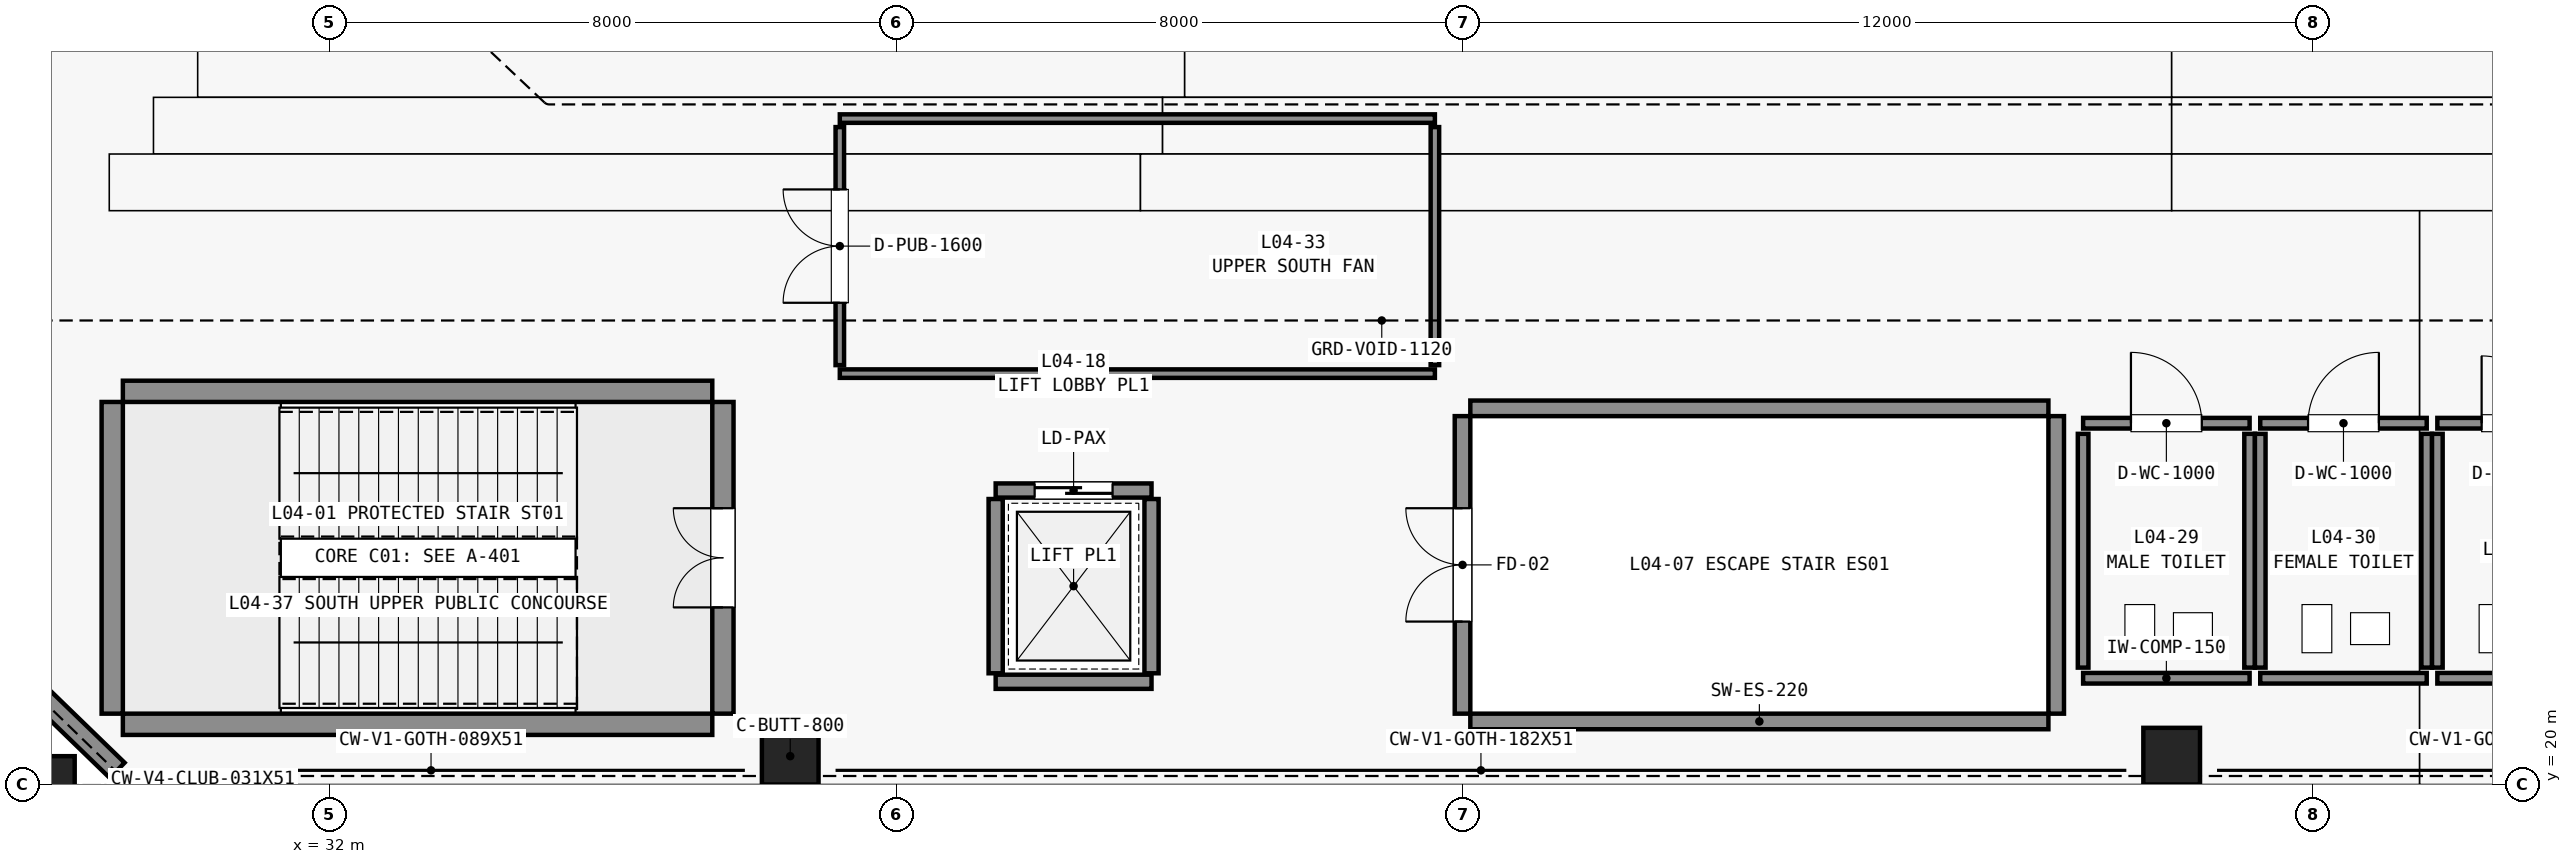
"""IFC4 building model, lengths in metres.
Left out: names, types, materials, properties, quantities, classifications, styles, units other than length and angle.
Written with IfcOpenShell. Run it as: python <this file> out.ifc"""

import sys

from ifc_helpers import new_model, si_unit, direction, frame, frame_2d, origin, origin_2d, place, context, subcontext, project, spatial, rectangle, extrude, element, fill, save


model = new_model("IFC4")
c1 = context("Model", 3, precision=1e-05, world=origin(), true_north=direction((0.0, 1.0)))
c2 = subcontext(c1, "Body", "Model", "MODEL_VIEW")
j1 = project(units=[si_unit("LENGTHUNIT", "METRE"), si_unit("PLANEANGLEUNIT", "RADIAN")], contexts=[c1])
p1 = place(None, origin())
s1 = spatial("IfcSite", under=j1, at=p1, CompositionType="ELEMENT")
p2 = place(p1, origin())
s2 = spatial("IfcBuilding", under=s1, at=p2, CompositionType="ELEMENT")
p3 = place(p2, frame((0.0, 0.0, 21.0)))
s3 = spatial("IfcBuildingStorey", under=s2, at=p3, CompositionType="ELEMENT", Elevation=21.0)
for number, where, z_axis, x_axis in (
    (1, (38.5, 20.4, 0.0), (0.0, 0.0, 1.0), (1.0, 0.0, 0.0)),
    (2, (58.0, 20.4, 0.0), (0.0, 0.0, 1.0), (1.0, 0.0, 0.0)),
):
    element("IfcColumn", number, at=place(p3, frame(where, z_axis=z_axis, x_axis=x_axis)), inside=s3, PredefinedType="PILASTER", context=c2, shape_type="SweptSolid", body=[
        extrude(rectangle(XDim=0.8, YDim=0.8, at=origin_2d()), origin(), (0.0, 0.0, 1.0), 5.06),
    ])
p4 = place(p3, frame((28.0, 20.0, 0.0), z_axis=(0.0, 0.0, 1.0), x_axis=(1.0, 0.0, 0.0)))
e3 = element("IfcColumn", 3, at=p4, inside=s3, PredefinedType="PILASTER", context=c2, shape_type="SweptSolid", body=[
    extrude(rectangle(XDim=0.8, YDim=0.8, at=origin_2d()), origin(), (0.0, 0.0, 1.0), 5.08),
])
for number, where, z_axis, x_axis in (
    (4, (29.08, 20.85, 0.0), (0.0, 0.0, 1.0), (1.0, 0.0, 0.0)),
    (5, (29.08, 25.55, 0.0), (0.0, 0.0, 1.0), (1.0, 0.0, 0.0)),
):
    element("IfcWall", number, at=place(p3, frame(where, z_axis=z_axis, x_axis=x_axis)), inside=s3, PredefinedType="SHEAR", context=c2, shape_type="SweptSolid", body=[
        extrude(rectangle(XDim=8.32, YDim=0.3, at=frame_2d((4.16, 0.0))), origin(), (0.0, 0.0, 1.0), 5.4),
    ])
p5 = place(p3, frame((28.93, 21.0, 0.0), z_axis=(0.0, 0.0, 1.0), x_axis=(0.0, 1.0, 0.0)))
e6 = element("IfcWall", 6, at=p5, inside=s3, PredefinedType="SHEAR", context=c2, shape_type="SweptSolid", body=[
    extrude(rectangle(XDim=4.4, YDim=0.3, at=frame_2d((2.2, 0.0))), origin(), (0.0, 0.0, 1.0), 5.4),
])
p6 = place(p3, frame((37.55, 21.0, 0.0), z_axis=(0.0, 0.0, 1.0), x_axis=(0.0, 1.0, 0.0)))
e7 = element("IfcWall", 7, at=p6, inside=s3, PredefinedType="SHEAR", context=c2, shape_type="SweptSolid", body=[
    extrude(rectangle(XDim=4.4, YDim=0.3, at=frame_2d((2.2, 0.0))), origin(), (0.0, 0.0, 1.0), 5.4),
])
p7 = place(p6, frame((1.5, 0.0, 0.0)))
e8 = element("IfcOpeningElement", 8, at=p7, cuts=e7, PredefinedType="OPENING", context=c2, shape_type="SweptSolid", body=[
    extrude(rectangle(XDim=1.4, YDim=2.2, at=frame_2d((0.7, 1.1))), frame((0.0, 0.16, 0.0), z_axis=(0.0, -1.0, 0.0), x_axis=(1.0, 0.0, 0.0)), (0.0, 0.0, 1.0), 0.32),
])
p8 = place(p3, frame((41.4, 21.45, 0.0), z_axis=(0.0, 0.0, 1.0), x_axis=(1.0, 0.0, 0.0)))
e9 = element("IfcWall", 9, at=p8, inside=s3, PredefinedType="STANDARD", context=c2, shape_type="SweptSolid", body=[
    extrude(rectangle(XDim=2.2, YDim=0.2, at=frame_2d((1.1, 0.0))), origin(), (0.0, 0.0, 1.0), 5.06),
])
p9 = place(p3, frame((41.4, 24.15, 0.0), z_axis=(0.0, 0.0, 1.0), x_axis=(1.0, 0.0, 0.0)))
e10 = element("IfcWall", 10, at=p9, inside=s3, PredefinedType="STANDARD", context=c2, shape_type="SweptSolid", body=[
    extrude(rectangle(XDim=2.2, YDim=0.2, at=frame_2d((1.1, 0.0))), origin(), (0.0, 0.0, 1.0), 5.06),
])
p10 = place(p9, frame((0.55, 0.0, 0.0)))
e11 = element("IfcOpeningElement", 11, at=p10, cuts=e10, PredefinedType="OPENING", context=c2, shape_type="SweptSolid", body=[
    extrude(rectangle(XDim=1.1, YDim=2.15, at=frame_2d((0.55, 1.075))), frame((0.0, 0.11, 0.0), z_axis=(0.0, -1.0, 0.0), x_axis=(1.0, 0.0, 0.0)), (0.0, 0.0, 1.0), 0.22),
])
for number, where, z_axis, x_axis in (
    (12, (41.4, 21.57, 0.0), (0.0, 0.0, 1.0), (0.0, 1.0, 0.0)),
    (13, (43.6, 21.57, 0.0), (0.0, 0.0, 1.0), (0.0, 1.0, 0.0)),
):
    element("IfcWall", number, at=place(p3, frame(where, z_axis=z_axis, x_axis=x_axis)), inside=s3, PredefinedType="STANDARD", context=c2, shape_type="SweptSolid", body=[
        extrude(rectangle(XDim=2.46, YDim=0.2, at=frame_2d((1.23, 0.0))), origin(), (0.0, 0.0, 1.0), 5.06),
    ])
p11 = place(p3, frame((16.2, 32.6, 0.0), z_axis=(0.0, 0.0, 1.0), x_axis=(0.718237441527, -0.695798086796, 0.0)))
e14 = element("IfcWall", 14, at=p11, inside=s3, PredefinedType="STANDARD", context=c2, shape_type="SweptSolid", body=[
    extrude(rectangle(XDim=17.822, YDim=0.3, at=frame_2d((8.911, 0.0))), origin(), (0.0, 0.0, 1.0), 4.21),
])
p12 = place(p11, frame((1.1, 0.0, 0.95)))
e15 = element("IfcOpeningElement", 15, at=p12, cuts=e14, PredefinedType="OPENING", context=c2, shape_type="SweptSolid", body=[
    extrude(rectangle(XDim=0.9, YDim=2.85, at=frame_2d((0.45, 1.425))), frame((0.0, 0.16, 0.0), z_axis=(0.0, -1.0, 0.0), x_axis=(1.0, 0.0, 0.0)), (0.0, 0.0, 1.0), 0.32),
])
p13 = place(p11, frame((2.45, 0.0, 0.95)))
e16 = element("IfcOpeningElement", 16, at=p13, cuts=e14, PredefinedType="OPENING", context=c2, shape_type="SweptSolid", body=[
    extrude(rectangle(XDim=0.9, YDim=2.85, at=frame_2d((0.45, 1.425))), frame((0.0, 0.16, 0.0), z_axis=(0.0, -1.0, 0.0), x_axis=(1.0, 0.0, 0.0)), (0.0, 0.0, 1.0), 0.32),
])
p14 = place(p11, frame((4.3, 0.0, 0.95)))
e17 = element("IfcOpeningElement", 17, at=p14, cuts=e14, PredefinedType="OPENING", context=c2, shape_type="SweptSolid", body=[
    extrude(rectangle(XDim=0.9, YDim=2.85, at=frame_2d((0.45, 1.425))), frame((0.0, 0.16, 0.0), z_axis=(0.0, -1.0, 0.0), x_axis=(1.0, 0.0, 0.0)), (0.0, 0.0, 1.0), 0.32),
])
p15 = place(p11, frame((5.65, 0.0, 0.95)))
e18 = element("IfcOpeningElement", 18, at=p15, cuts=e14, PredefinedType="OPENING", context=c2, shape_type="SweptSolid", body=[
    extrude(rectangle(XDim=0.9, YDim=2.85, at=frame_2d((0.45, 1.425))), frame((0.0, 0.16, 0.0), z_axis=(0.0, -1.0, 0.0), x_axis=(1.0, 0.0, 0.0)), (0.0, 0.0, 1.0), 0.32),
])
p16 = place(p11, frame((7.5, 0.0, 0.95)))
e19 = element("IfcOpeningElement", 19, at=p16, cuts=e14, PredefinedType="OPENING", context=c2, shape_type="SweptSolid", body=[
    extrude(rectangle(XDim=0.9, YDim=2.85, at=frame_2d((0.45, 1.425))), frame((0.0, 0.16, 0.0), z_axis=(0.0, -1.0, 0.0), x_axis=(1.0, 0.0, 0.0)), (0.0, 0.0, 1.0), 0.32),
])
p17 = place(p11, frame((8.85, 0.0, 0.95)))
e20 = element("IfcOpeningElement", 20, at=p17, cuts=e14, PredefinedType="OPENING", context=c2, shape_type="SweptSolid", body=[
    extrude(rectangle(XDim=0.9, YDim=2.85, at=frame_2d((0.45, 1.425))), frame((0.0, 0.16, 0.0), z_axis=(0.0, -1.0, 0.0), x_axis=(1.0, 0.0, 0.0)), (0.0, 0.0, 1.0), 0.32),
])
p18 = place(p11, frame((10.7, 0.0, 0.95)))
e21 = element("IfcOpeningElement", 21, at=p18, cuts=e14, PredefinedType="OPENING", context=c2, shape_type="SweptSolid", body=[
    extrude(rectangle(XDim=0.9, YDim=2.85, at=frame_2d((0.45, 1.425))), frame((0.0, 0.16, 0.0), z_axis=(0.0, -1.0, 0.0), x_axis=(1.0, 0.0, 0.0)), (0.0, 0.0, 1.0), 0.32),
])
p19 = place(p11, frame((12.05, 0.0, 0.95)))
e22 = element("IfcOpeningElement", 22, at=p19, cuts=e14, PredefinedType="OPENING", context=c2, shape_type="SweptSolid", body=[
    extrude(rectangle(XDim=0.9, YDim=2.85, at=frame_2d((0.45, 1.425))), frame((0.0, 0.16, 0.0), z_axis=(0.0, -1.0, 0.0), x_axis=(1.0, 0.0, 0.0)), (0.0, 0.0, 1.0), 0.32),
])
p20 = place(p11, frame((13.9, 0.0, 0.95)))
e23 = element("IfcOpeningElement", 23, at=p20, cuts=e14, PredefinedType="OPENING", context=c2, shape_type="SweptSolid", body=[
    extrude(rectangle(XDim=0.9, YDim=2.85, at=frame_2d((0.45, 1.425))), frame((0.0, 0.16, 0.0), z_axis=(0.0, -1.0, 0.0), x_axis=(1.0, 0.0, 0.0)), (0.0, 0.0, 1.0), 0.32),
])
p21 = place(p11, frame((15.25, 0.0, 0.95)))
e24 = element("IfcOpeningElement", 24, at=p21, cuts=e14, PredefinedType="OPENING", context=c2, shape_type="SweptSolid", body=[
    extrude(rectangle(XDim=0.9, YDim=2.85, at=frame_2d((0.45, 1.425))), frame((0.0, 0.16, 0.0), z_axis=(0.0, -1.0, 0.0), x_axis=(1.0, 0.0, 0.0)), (0.0, 0.0, 1.0), 0.32),
])
for number, where, z_axis, x_axis in (
    (25, (48.1, 20.89, 0.0), (0.0, 0.0, 1.0), (1.0, 0.0, 0.0)),
    (26, (48.1, 25.31, 0.0), (0.0, 0.0, 1.0), (1.0, 0.0, 0.0)),
):
    element("IfcWall", number, at=place(p3, frame(where, z_axis=z_axis, x_axis=x_axis)), inside=s3, PredefinedType="SHEAR", context=c2, shape_type="SweptSolid", body=[
        extrude(rectangle(XDim=8.16, YDim=0.22, at=frame_2d((4.08, 0.0))), origin(), (0.0, 0.0, 1.0), 5.06),
    ])
p22 = place(p3, frame((47.99, 21.0, 0.0), z_axis=(0.0, 0.0, 1.0), x_axis=(0.0, 1.0, 0.0)))
e27 = element("IfcWall", 27, at=p22, inside=s3, PredefinedType="SHEAR", context=c2, shape_type="SweptSolid", body=[
    extrude(rectangle(XDim=4.2, YDim=0.22, at=frame_2d((2.1, 0.0))), origin(), (0.0, 0.0, 1.0), 5.06),
])
p23 = place(p22, frame((1.3, 0.0, 0.0)))
e28 = element("IfcOpeningElement", 28, at=p23, cuts=e27, PredefinedType="OPENING", context=c2, shape_type="SweptSolid", body=[
    extrude(rectangle(XDim=1.6, YDim=2.2, at=frame_2d((0.8, 1.1))), frame((0.0, 0.12, 0.0), z_axis=(0.0, -1.0, 0.0), x_axis=(1.0, 0.0, 0.0)), (0.0, 0.0, 1.0), 0.24),
])
p24 = place(p3, frame((56.37, 21.0, 0.0), z_axis=(0.0, 0.0, 1.0), x_axis=(0.0, 1.0, 0.0)))
e29 = element("IfcWall", 29, at=p24, inside=s3, PredefinedType="SHEAR", context=c2, shape_type="SweptSolid", body=[
    extrude(rectangle(XDim=4.2, YDim=0.22, at=frame_2d((2.1, 0.0))), origin(), (0.0, 0.0, 1.0), 5.06),
])
p25 = place(p3, frame((56.75, 21.5, 0.0), z_axis=(0.0, 0.0, 1.0), x_axis=(1.0, 0.0, 0.0)))
e30 = element("IfcWall", 30, at=p25, inside=s3, PredefinedType="STANDARD", context=c2, shape_type="SweptSolid", body=[
    extrude(rectangle(XDim=2.35, YDim=0.15, at=frame_2d((1.175, 0.0))), origin(), (0.0, 0.0, 1.0), 5.06),
])
p26 = place(p3, frame((56.75, 25.1, 0.0), z_axis=(0.0, 0.0, 1.0), x_axis=(1.0, 0.0, 0.0)))
e31 = element("IfcWall", 31, at=p26, inside=s3, PredefinedType="STANDARD", context=c2, shape_type="SweptSolid", body=[
    extrude(rectangle(XDim=2.35, YDim=0.15, at=frame_2d((1.175, 0.0))), origin(), (0.0, 0.0, 1.0), 5.06),
])
p27 = place(p26, frame((0.675, 0.0, 0.0)))
e32 = element("IfcOpeningElement", 32, at=p27, cuts=e31, PredefinedType="OPENING", context=c2, shape_type="SweptSolid", body=[
    extrude(rectangle(XDim=1.0, YDim=2.15, at=frame_2d((0.5, 1.075))), frame((0.0, 0.085, 0.0), z_axis=(0.0, -1.0, 0.0), x_axis=(1.0, 0.0, 0.0)), (0.0, 0.0, 1.0), 0.17),
])
for number, where, z_axis, x_axis in (
    (33, (56.75, 21.65, 0.0), (0.0, 0.0, 1.0), (0.0, 1.0, 0.0)),
    (34, (59.1, 21.65, 0.0), (0.0, 0.0, 1.0), (0.0, 1.0, 0.0)),
):
    element("IfcWall", number, at=place(p3, frame(where, z_axis=z_axis, x_axis=x_axis)), inside=s3, PredefinedType="STANDARD", context=c2, shape_type="SweptSolid", body=[
        extrude(rectangle(XDim=3.3, YDim=0.15, at=frame_2d((1.65, 0.0))), origin(), (0.0, 0.0, 1.0), 5.06),
    ])
p28 = place(p3, frame((59.25, 21.5, 0.0), z_axis=(0.0, 0.0, 1.0), x_axis=(1.0, 0.0, 0.0)))
e35 = element("IfcWall", 35, at=p28, inside=s3, PredefinedType="STANDARD", context=c2, shape_type="SweptSolid", body=[
    extrude(rectangle(XDim=2.35, YDim=0.15, at=frame_2d((1.175, 0.0))), origin(), (0.0, 0.0, 1.0), 5.06),
])
p29 = place(p3, frame((59.25, 25.1, 0.0), z_axis=(0.0, 0.0, 1.0), x_axis=(1.0, 0.0, 0.0)))
e36 = element("IfcWall", 36, at=p29, inside=s3, PredefinedType="STANDARD", context=c2, shape_type="SweptSolid", body=[
    extrude(rectangle(XDim=2.35, YDim=0.15, at=frame_2d((1.175, 0.0))), origin(), (0.0, 0.0, 1.0), 5.06),
])
p30 = place(p29, frame((0.675, 0.0, 0.0)))
e37 = element("IfcOpeningElement", 37, at=p30, cuts=e36, PredefinedType="OPENING", context=c2, shape_type="SweptSolid", body=[
    extrude(rectangle(XDim=1.0, YDim=2.15, at=frame_2d((0.5, 1.075))), frame((0.0, 0.085, 0.0), z_axis=(0.0, -1.0, 0.0), x_axis=(1.0, 0.0, 0.0)), (0.0, 0.0, 1.0), 0.17),
])
for number, where, z_axis, x_axis in (
    (38, (59.25, 21.65, 0.0), (0.0, 0.0, 1.0), (0.0, 1.0, 0.0)),
    (39, (61.6, 21.65, 0.0), (0.0, 0.0, 1.0), (0.0, 1.0, 0.0)),
):
    element("IfcWall", number, at=place(p3, frame(where, z_axis=z_axis, x_axis=x_axis)), inside=s3, PredefinedType="STANDARD", context=c2, shape_type="SweptSolid", body=[
        extrude(rectangle(XDim=3.3, YDim=0.15, at=frame_2d((1.65, 0.0))), origin(), (0.0, 0.0, 1.0), 5.06),
    ])
p31 = place(p3, frame((61.75, 21.5, 0.0), z_axis=(0.0, 0.0, 1.0), x_axis=(1.0, 0.0, 0.0)))
e40 = element("IfcWall", 40, at=p31, inside=s3, PredefinedType="STANDARD", context=c2, shape_type="SweptSolid", body=[
    extrude(rectangle(XDim=2.2, YDim=0.15, at=frame_2d((1.1, 0.0))), origin(), (0.0, 0.0, 1.0), 5.06),
])
p32 = place(p3, frame((61.75, 25.1, 0.0), z_axis=(0.0, 0.0, 1.0), x_axis=(1.0, 0.0, 0.0)))
e41 = element("IfcWall", 41, at=p32, inside=s3, PredefinedType="STANDARD", context=c2, shape_type="SweptSolid", body=[
    extrude(rectangle(XDim=2.2, YDim=0.15, at=frame_2d((1.1, 0.0))), origin(), (0.0, 0.0, 1.0), 5.06),
])
p33 = place(p32, frame((0.625, 0.0, 0.0)))
e42 = element("IfcOpeningElement", 42, at=p33, cuts=e41, PredefinedType="OPENING", context=c2, shape_type="SweptSolid", body=[
    extrude(rectangle(XDim=0.95, YDim=2.15, at=frame_2d((0.475, 1.075))), frame((0.0, 0.085, 0.0), z_axis=(0.0, -1.0, 0.0), x_axis=(1.0, 0.0, 0.0)), (0.0, 0.0, 1.0), 0.17),
])
p34 = place(p3, frame((61.75, 21.65, 0.0), z_axis=(0.0, 0.0, 1.0), x_axis=(0.0, 1.0, 0.0)))
e43 = element("IfcWall", 43, at=p34, inside=s3, PredefinedType="STANDARD", context=c2, shape_type="SweptSolid", body=[
    extrude(rectangle(XDim=3.3, YDim=0.15, at=frame_2d((1.65, 0.0))), origin(), (0.0, 0.0, 1.0), 5.06),
])
for number, where, z_axis, x_axis in (
    (44, (39.2, 25.8, 0.0), (0.0, 0.0, 1.0), (1.0, 0.0, 0.0)),
    (45, (39.2, 29.4, 0.0), (0.0, 0.0, 1.0), (1.0, 0.0, 0.0)),
):
    element("IfcWall", number, at=place(p3, frame(where, z_axis=z_axis, x_axis=x_axis)), inside=s3, PredefinedType="PARTITIONING", context=c2, shape_type="SweptSolid", body=[
        extrude(rectangle(XDim=8.4, YDim=0.12, at=frame_2d((4.2, 0.0))), origin(), (0.0, 0.0, 1.0), 5.06),
    ])
p35 = place(p3, frame((39.2, 25.92, 0.0), z_axis=(0.0, 0.0, 1.0), x_axis=(0.0, 1.0, 0.0)))
e46 = element("IfcWall", 46, at=p35, inside=s3, PredefinedType="PARTITIONING", context=c2, shape_type="SweptSolid", body=[
    extrude(rectangle(XDim=3.36, YDim=0.12, at=frame_2d((1.68, 0.0))), origin(), (0.0, 0.0, 1.0), 5.06),
])
p36 = place(p35, frame((0.88, 0.0, 0.0)))
e47 = element("IfcOpeningElement", 47, at=p36, cuts=e46, PredefinedType="OPENING", context=c2, shape_type="SweptSolid", body=[
    extrude(rectangle(XDim=1.6, YDim=2.25, at=frame_2d((0.8, 1.125))), frame((0.0, 0.07, 0.0), z_axis=(0.0, -1.0, 0.0), x_axis=(1.0, 0.0, 0.0)), (0.0, 0.0, 1.0), 0.14),
])
p37 = place(p3, frame((47.6, 25.92, 0.0), z_axis=(0.0, 0.0, 1.0), x_axis=(0.0, 1.0, 0.0)))
e48 = element("IfcWall", 48, at=p37, inside=s3, PredefinedType="PARTITIONING", context=c2, shape_type="SweptSolid", body=[
    extrude(rectangle(XDim=3.36, YDim=0.12, at=frame_2d((1.68, 0.0))), origin(), (0.0, 0.0, 1.0), 5.06),
])
p38 = place(p10, origin())
e49 = element("IfcDoor", 49, at=p38, inside=s3, OperationType="SLIDING_TO_LEFT", PredefinedType="DOOR", context=c2, shape_type="SweptSolid", body=[
    extrude(rectangle(XDim=1.1, YDim=2.15, at=frame_2d((0.55, 1.075))), frame((0.0, 0.025, 0.0), z_axis=(0.0, -1.0, 0.0), x_axis=(1.0, 0.0, 0.0)), (0.0, 0.0, 1.0), 0.05),
])
fill(e11, e49)
p39 = place(p7, origin())
e50 = element("IfcDoor", 50, at=p39, inside=s3, OperationType="DOUBLE_DOOR_SINGLE_SWING", PredefinedType="DOOR", context=c2, shape_type="SweptSolid", body=[
    extrude(rectangle(XDim=1.4, YDim=2.2, at=frame_2d((0.7, 1.1))), frame((0.0, 0.025, 0.0), z_axis=(0.0, -1.0, 0.0), x_axis=(1.0, 0.0, 0.0)), (0.0, 0.0, 1.0), 0.05),
])
fill(e8, e50)
p40 = place(p23, origin())
e51 = element("IfcDoor", 51, at=p40, inside=s3, OperationType="DOUBLE_DOOR_SINGLE_SWING", PredefinedType="DOOR", context=c2, shape_type="SweptSolid", body=[
    extrude(rectangle(XDim=1.6, YDim=2.2, at=frame_2d((0.8, 1.1))), frame((0.0, 0.025, 0.0), z_axis=(0.0, -1.0, 0.0), x_axis=(1.0, 0.0, 0.0)), (0.0, 0.0, 1.0), 0.05),
])
fill(e28, e51)
p41 = place(p27, origin())
e52 = element("IfcDoor", 52, at=p41, inside=s3, OperationType="SINGLE_SWING_LEFT", PredefinedType="DOOR", context=c2, shape_type="SweptSolid", body=[
    extrude(rectangle(XDim=1.0, YDim=2.15, at=frame_2d((0.5, 1.075))), frame((0.0, 0.025, 0.0), z_axis=(0.0, -1.0, 0.0), x_axis=(1.0, 0.0, 0.0)), (0.0, 0.0, 1.0), 0.05),
])
fill(e32, e52)
p42 = place(p30, origin())
e53 = element("IfcDoor", 53, at=p42, inside=s3, OperationType="SINGLE_SWING_RIGHT", PredefinedType="DOOR", context=c2, shape_type="SweptSolid", body=[
    extrude(rectangle(XDim=1.0, YDim=2.15, at=frame_2d((0.5, 1.075))), frame((0.0, 0.025, 0.0), z_axis=(0.0, -1.0, 0.0), x_axis=(1.0, 0.0, 0.0)), (0.0, 0.0, 1.0), 0.05),
])
fill(e37, e53)
p43 = place(p33, origin())
e54 = element("IfcDoor", 54, at=p43, inside=s3, OperationType="SINGLE_SWING_LEFT", PredefinedType="DOOR", context=c2, shape_type="SweptSolid", body=[
    extrude(rectangle(XDim=0.95, YDim=2.15, at=frame_2d((0.475, 1.075))), frame((0.0, 0.025, 0.0), z_axis=(0.0, -1.0, 0.0), x_axis=(1.0, 0.0, 0.0)), (0.0, 0.0, 1.0), 0.05),
])
fill(e42, e54)
p44 = place(p36, origin())
e55 = element("IfcDoor", 55, at=p44, inside=s3, OperationType="DOUBLE_DOOR_SINGLE_SWING", PredefinedType="DOOR", context=c2, shape_type="SweptSolid", body=[
    extrude(rectangle(XDim=1.6, YDim=2.25, at=frame_2d((0.8, 1.125))), frame((0.0, 0.025, 0.0), z_axis=(0.0, -1.0, 0.0), x_axis=(1.0, 0.0, 0.0)), (0.0, 0.0, 1.0), 0.05),
])
fill(e47, e55)
save(model, sys.argv[1])
